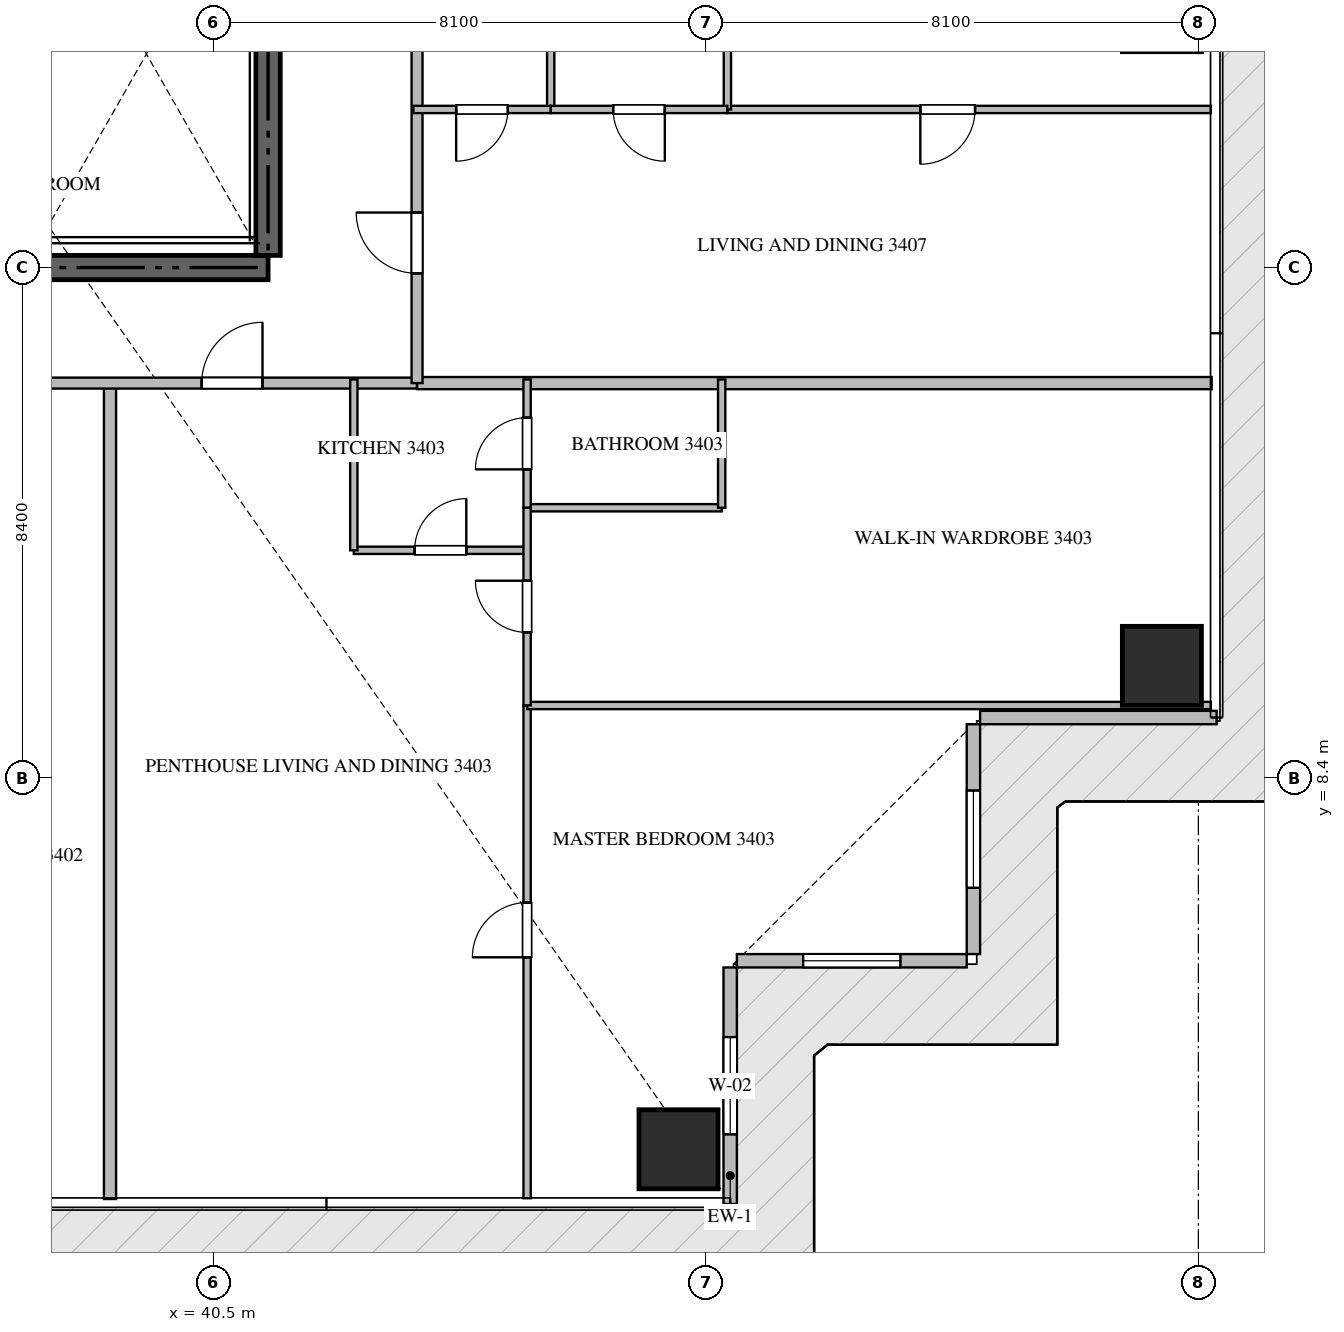
"""IFC4 building model, lengths in metres.
Left out: names, types, materials, properties, quantities, classifications, styles, units other than length and angle.
Written with IfcOpenShell. Run it as: python <this file> out.ifc"""

import sys

from ifc_helpers import new_model, si_unit, direction, frame, frame_2d, origin, origin_2d, place, context, subcontext, project, spatial, rectangle, extrude, source, transform, mapped, element, fill, save


model = new_model("IFC4")
c1 = context("Model", 3, precision=1e-05, world=origin(), true_north=direction((0.0, 1.0)))
c2 = subcontext(c1, "Body", "Model", "MODEL_VIEW")
j1 = project(units=[si_unit("LENGTHUNIT", "METRE"), si_unit("PLANEANGLEUNIT", "RADIAN")], contexts=[c1])
p1 = place(None, origin())
s1 = spatial("IfcSite", under=j1, at=p1, CompositionType="ELEMENT")
p2 = place(p1, origin())
s2 = spatial("IfcBuilding", under=s1, at=p2, CompositionType="ELEMENT")
p3 = place(p2, frame((0.0, 0.0, 138.9)))
s3 = spatial("IfcBuildingStorey", under=s2, at=p3, CompositionType="ELEMENT", Elevation=138.9)
p4 = place(p3, frame((23.4, 16.8, -0.26), z_axis=(0.0, 0.0, 1.0), x_axis=(1.0, 0.0, 0.0)))
e1 = element("IfcWall", 1, at=p4, inside=s3, PredefinedType="SHEAR", context=c2, shape_type="SweptSolid", body=[
    extrude(rectangle(XDim=18.0, YDim=0.4, at=frame_2d((9.0, 0.0))), origin(), (0.0, 0.0, 1.0), 3.748),
])
p5 = place(p3, frame((41.4, 17.0, -0.26), z_axis=(0.0, 0.0, 1.0), x_axis=(0.0, 1.0, 0.0)))
e2 = element("IfcWall", 2, at=p5, inside=s3, PredefinedType="SHEAR", context=c2, shape_type="SweptSolid", body=[
    extrude(rectangle(XDim=8.35, YDim=0.4, at=frame_2d((4.175, 0.0))), origin(), (0.0, 0.0, 1.0), 3.748),
])
m1 = source(origin(), c2, "Body", "SweptSolid", [
    extrude(rectangle(XDim=1.3, YDim=1.3, at=origin_2d()), origin(), (0.0, 0.0, 1.0), 3.75),
])
for number, where, z_axis, x_axis in (
    (3, (48.15, 2.3, -0.26), (0.0, 0.0, 1.0), (1.0, 0.0, 0.0)),
    (4, (56.1, 10.25, -0.26), (0.0, 0.0, 1.0), (1.0, 0.0, 0.0)),
):
    element("IfcColumn", number, at=place(p3, frame(where, z_axis=z_axis, x_axis=x_axis)), inside=s3, PredefinedType="COLUMN", context=c2, shape_type="MappedRepresentation", body=[
        mapped(m1, transform((0.0, 0.0, 0.0), scale=1.0)),
    ])
p6 = place(p3, frame((49.0, 1.4, 0.0), z_axis=(0.0, 0.0, 1.0), x_axis=(0.0, 1.0, 0.0)))
e5 = element("IfcWall", 5, at=p6, inside=s3, PredefinedType="ELEMENTEDWALL", context=c2, shape_type="SweptSolid", body=[
    extrude(rectangle(XDim=3.89, YDim=0.22, at=frame_2d((1.945, 0.0))), origin(), (0.0, 0.0, 1.0), 3.475),
])
p7 = place(p6, frame((1.145, 0.0, 0.65)))
e6 = element("IfcOpeningElement", 6, at=p7, cuts=e5, PredefinedType="OPENING", context=c2, shape_type="SweptSolid", body=[
    extrude(rectangle(XDim=1.6, YDim=2.1, at=frame_2d((0.8, 1.05))), frame((0.0, 0.12, 0.0), z_axis=(0.0, -1.0, 0.0), x_axis=(1.0, 0.0, 0.0)), (0.0, 0.0, 1.0), 0.24),
])
p8 = place(p3, frame((49.11, 5.4, 0.0), z_axis=(0.0, 0.0, 1.0), x_axis=(1.0, 0.0, 0.0)))
e7 = element("IfcWall", 7, at=p8, inside=s3, PredefinedType="ELEMENTEDWALL", context=c2, shape_type="SweptSolid", body=[
    extrude(rectangle(XDim=3.78, YDim=0.22, at=frame_2d((1.89, 0.0))), origin(), (0.0, 0.0, 1.0), 3.475),
])
p9 = place(p8, frame((1.09, 0.0, 0.65)))
e8 = element("IfcOpeningElement", 8, at=p9, cuts=e7, PredefinedType="OPENING", context=c2, shape_type="SweptSolid", body=[
    extrude(rectangle(XDim=1.6, YDim=2.1, at=frame_2d((0.8, 1.05))), frame((0.0, 0.12, 0.0), z_axis=(0.0, -1.0, 0.0), x_axis=(1.0, 0.0, 0.0)), (0.0, 0.0, 1.0), 0.24),
])
p10 = place(p3, frame((53.0, 5.51, 0.0), z_axis=(0.0, 0.0, 1.0), x_axis=(0.0, 1.0, 0.0)))
e9 = element("IfcWall", 9, at=p10, inside=s3, PredefinedType="ELEMENTEDWALL", context=c2, shape_type="SweptSolid", body=[
    extrude(rectangle(XDim=3.78, YDim=0.22, at=frame_2d((1.89, 0.0))), origin(), (0.0, 0.0, 1.0), 3.475),
])
p11 = place(p10, frame((1.09, 0.0, 0.65)))
e10 = element("IfcOpeningElement", 10, at=p11, cuts=e9, PredefinedType="OPENING", context=c2, shape_type="SweptSolid", body=[
    extrude(rectangle(XDim=1.6, YDim=2.1, at=frame_2d((0.8, 1.05))), frame((0.0, 0.12, 0.0), z_axis=(0.0, -1.0, 0.0), x_axis=(1.0, 0.0, 0.0)), (0.0, 0.0, 1.0), 0.24),
])
p12 = place(p3, frame((53.11, 9.4, 0.0), z_axis=(0.0, 0.0, 1.0), x_axis=(1.0, 0.0, 0.0)))
e11 = element("IfcWall", 11, at=p12, inside=s3, PredefinedType="ELEMENTEDWALL", context=c2, shape_type="SweptSolid", body=[
    extrude(rectangle(XDim=3.89, YDim=0.22, at=frame_2d((1.945, 0.0))), origin(), (0.0, 0.0, 1.0), 3.475),
])
p13 = place(p3, frame((38.8, 1.482, 0.0), z_axis=(0.0, 0.0, 1.0), x_axis=(0.0, 1.0, 0.0)))
e12 = element("IfcWall", 12, at=p13, inside=s3, PredefinedType="PARTITIONING", context=c2, shape_type="SweptSolid", body=[
    extrude(rectangle(XDim=13.418, YDim=0.2, at=frame_2d((6.709, 0.0))), origin(), (0.0, 0.0, 1.0), 3.49),
])
p14 = place(p3, frame((43.85, 14.9, 0.0), z_axis=(0.0, 0.0, 1.0), x_axis=(1.0, 0.0, 0.0)))
e13 = element("IfcWall", 13, at=p14, inside=s3, PredefinedType="PARTITIONING", context=c2, shape_type="SweptSolid", body=[
    extrude(rectangle(XDim=13.068, YDim=0.2, at=frame_2d((6.534, 0.0))), origin(), (0.0, 0.0, 1.0), 3.49),
])
p15 = place(p3, frame((20.952, 14.9, 0.0), z_axis=(0.0, 0.0, 1.0), x_axis=(1.0, 0.0, 0.0)))
e14 = element("IfcWall", 14, at=p15, inside=s3, PredefinedType="PARTITIONING", context=c2, shape_type="SweptSolid", body=[
    extrude(rectangle(XDim=22.896, YDim=0.18, at=frame_2d((11.448, 0.0))), origin(), (0.0, 0.0, 1.0), 3.49),
])
p16 = place(p15, frame((2.54, 0.0, 0.0)))
e15 = element("IfcOpeningElement", 15, at=p16, cuts=e14, PredefinedType="OPENING", context=c2, shape_type="SweptSolid", body=[
    extrude(rectangle(XDim=1.0, YDim=2.15, at=frame_2d((0.5, 1.075))), frame((0.0, 0.1, 0.0), z_axis=(0.0, -1.0, 0.0), x_axis=(1.0, 0.0, 0.0)), (0.0, 0.0, 1.0), 0.2),
])
p17 = place(p15, frame((14.911, 0.0, 0.0)))
e16 = element("IfcOpeningElement", 16, at=p17, cuts=e14, PredefinedType="OPENING", context=c2, shape_type="SweptSolid", body=[
    extrude(rectangle(XDim=1.0, YDim=2.15, at=frame_2d((0.5, 1.075))), frame((0.0, 0.1, 0.0), z_axis=(0.0, -1.0, 0.0), x_axis=(1.0, 0.0, 0.0)), (0.0, 0.0, 1.0), 0.2),
])
p18 = place(p15, frame((19.356, 0.0, 0.0)))
e17 = element("IfcOpeningElement", 17, at=p18, cuts=e14, PredefinedType="OPENING", context=c2, shape_type="SweptSolid", body=[
    extrude(rectangle(XDim=1.0, YDim=2.15, at=frame_2d((0.5, 1.075))), frame((0.0, 0.1, 0.0), z_axis=(0.0, -1.0, 0.0), x_axis=(1.0, 0.0, 0.0)), (0.0, 0.0, 1.0), 0.2),
])
p19 = place(p3, frame((43.85, 14.9, 0.0), z_axis=(0.0, 0.0, 1.0), x_axis=(0.0, 1.0, 0.0)))
e18 = element("IfcWall", 18, at=p19, inside=s3, PredefinedType="PARTITIONING", context=c2, shape_type="SweptSolid", body=[
    extrude(rectangle(XDim=18.7, YDim=0.18, at=frame_2d((9.35, 0.0))), origin(), (0.0, 0.0, 1.0), 3.49),
])
p20 = place(p19, frame((1.805, 0.0, 0.0)))
e19 = element("IfcOpeningElement", 19, at=p20, cuts=e18, PredefinedType="OPENING", context=c2, shape_type="SweptSolid", body=[
    extrude(rectangle(XDim=1.0, YDim=2.15, at=frame_2d((0.5, 1.075))), frame((0.0, 0.1, 0.0), z_axis=(0.0, -1.0, 0.0), x_axis=(1.0, 0.0, 0.0)), (0.0, 0.0, 1.0), 0.2),
])
p21 = place(p19, frame((14.833, 0.0, 0.0)))
e20 = element("IfcOpeningElement", 20, at=p21, cuts=e18, PredefinedType="OPENING", context=c2, shape_type="SweptSolid", body=[
    extrude(rectangle(XDim=1.0, YDim=2.15, at=frame_2d((0.5, 1.075))), frame((0.0, 0.1, 0.0), z_axis=(0.0, -1.0, 0.0), x_axis=(1.0, 0.0, 0.0)), (0.0, 0.0, 1.0), 0.2),
])
p22 = place(p3, frame((42.81, 12.15, 0.0), z_axis=(0.0, 0.0, 1.0), x_axis=(1.0, 0.0, 0.0)))
e21 = element("IfcWall", 21, at=p22, inside=s3, PredefinedType="PARTITIONING", context=c2, shape_type="SweptSolid", body=[
    extrude(rectangle(XDim=2.85, YDim=0.12, at=frame_2d((1.425, 0.0))), origin(), (0.0, 0.0, 1.0), 3.49),
])
p23 = place(p22, frame((1.0, 0.0, 0.0)))
e22 = element("IfcOpeningElement", 22, at=p23, cuts=e21, PredefinedType="OPENING", context=c2, shape_type="SweptSolid", body=[
    extrude(rectangle(XDim=0.85, YDim=2.1, at=frame_2d((0.425, 1.05))), frame((0.0, 0.07, 0.0), z_axis=(0.0, -1.0, 0.0), x_axis=(1.0, 0.0, 0.0)), (0.0, 0.0, 1.0), 0.14),
])
p24 = place(p3, frame((42.81, 12.15, 0.0), z_axis=(0.0, 0.0, 1.0), x_axis=(0.0, 1.0, 0.0)))
e23 = element("IfcWall", 23, at=p24, inside=s3, PredefinedType="PARTITIONING", context=c2, shape_type="SweptSolid", body=[
    extrude(rectangle(XDim=2.81, YDim=0.12, at=frame_2d((1.405, 0.0))), origin(), (0.0, 0.0, 1.0), 3.49),
])
p25 = place(p3, frame((45.66, 1.495, 0.0), z_axis=(0.0, 0.0, 1.0), x_axis=(0.0, 1.0, 0.0)))
e24 = element("IfcWall", 24, at=p25, inside=s3, PredefinedType="PARTITIONING", context=c2, shape_type="SweptSolid", body=[
    extrude(rectangle(XDim=8.103, YDim=0.12, at=frame_2d((4.051, 0.0))), origin(), (0.0, 0.0, 1.0), 3.49),
])
p26 = place(p25, frame((3.962, 0.0, 0.0)))
e25 = element("IfcOpeningElement", 25, at=p26, cuts=e24, PredefinedType="OPENING", context=c2, shape_type="SweptSolid", body=[
    extrude(rectangle(XDim=0.9, YDim=2.1, at=frame_2d((0.45, 1.05))), frame((0.0, 0.07, 0.0), z_axis=(0.0, -1.0, 0.0), x_axis=(1.0, 0.0, 0.0)), (0.0, 0.0, 1.0), 0.14),
])
p27 = place(p3, frame((45.66, 9.598, 0.0), z_axis=(0.0, 0.0, 1.0), x_axis=(1.0, 0.0, 0.0)))
e26 = element("IfcWall", 26, at=p27, inside=s3, PredefinedType="PARTITIONING", context=c2, shape_type="SweptSolid", body=[
    extrude(rectangle(XDim=11.245, YDim=0.12, at=frame_2d((5.623, 0.0))), origin(), (0.0, 0.0, 1.0), 3.49),
])
p28 = place(p3, frame((45.66, 12.85, 0.0), z_axis=(0.0, 0.0, 1.0), x_axis=(1.0, 0.0, 0.0)))
e27 = element("IfcWall", 27, at=p28, inside=s3, PredefinedType="PARTITIONING", context=c2, shape_type="SweptSolid", body=[
    extrude(rectangle(XDim=3.2, YDim=0.12, at=frame_2d((1.6, 0.0))), origin(), (0.0, 0.0, 1.0), 3.49),
])
p29 = place(p3, frame((48.86, 12.85, 0.0), z_axis=(0.0, 0.0, 1.0), x_axis=(0.0, 1.0, 0.0)))
e28 = element("IfcWall", 28, at=p29, inside=s3, PredefinedType="PARTITIONING", context=c2, shape_type="SweptSolid", body=[
    extrude(rectangle(XDim=2.11, YDim=0.12, at=frame_2d((1.055, 0.0))), origin(), (0.0, 0.0, 1.0), 3.49),
])
p30 = place(p3, frame((45.66, 9.6, 0.0), z_axis=(0.0, 0.0, 1.0), x_axis=(0.0, 1.0, 0.0)))
e29 = element("IfcWall", 29, at=p30, inside=s3, PredefinedType="PARTITIONING", context=c2, shape_type="SweptSolid", body=[
    extrude(rectangle(XDim=3.25, YDim=0.12, at=frame_2d((1.625, 0.0))), origin(), (0.0, 0.0, 1.0), 3.49),
])
p31 = place(p30, frame((1.2, 0.0, 0.0)))
e30 = element("IfcOpeningElement", 30, at=p31, cuts=e29, PredefinedType="OPENING", context=c2, shape_type="SweptSolid", body=[
    extrude(rectangle(XDim=0.85, YDim=2.1, at=frame_2d((0.425, 1.05))), frame((0.0, 0.07, 0.0), z_axis=(0.0, -1.0, 0.0), x_axis=(1.0, 0.0, 0.0)), (0.0, 0.0, 1.0), 0.14),
])
p32 = place(p3, frame((45.66, 12.852, 0.0), z_axis=(0.0, 0.0, 1.0), x_axis=(0.0, 1.0, 0.0)))
e31 = element("IfcWall", 31, at=p32, inside=s3, PredefinedType="PARTITIONING", context=c2, shape_type="SweptSolid", body=[
    extrude(rectangle(XDim=2.108, YDim=0.12, at=frame_2d((1.054, 0.0))), origin(), (0.0, 0.0, 1.0), 3.49),
])
p33 = place(p32, frame((0.629, 0.0, 0.0)))
e32 = element("IfcOpeningElement", 32, at=p33, cuts=e31, PredefinedType="OPENING", context=c2, shape_type="SweptSolid", body=[
    extrude(rectangle(XDim=0.85, YDim=2.1, at=frame_2d((0.425, 1.05))), frame((0.0, 0.07, 0.0), z_axis=(0.0, -1.0, 0.0), x_axis=(1.0, 0.0, 0.0)), (0.0, 0.0, 1.0), 0.14),
])
p34 = place(p3, frame((56.905, 19.4, 0.0), z_axis=(0.0, 0.0, 1.0), x_axis=(-1.0, 0.0, 0.0)))
e33 = element("IfcWall", 33, at=p34, inside=s3, PredefinedType="PARTITIONING", context=c2, shape_type="SweptSolid", body=[
    extrude(rectangle(XDim=7.951, YDim=0.12, at=frame_2d((3.976, 0.0))), origin(), (0.0, 0.0, 1.0), 3.49),
])
p35 = place(p34, frame((3.878, 0.0, 0.0)))
e34 = element("IfcOpeningElement", 34, at=p35, cuts=e33, PredefinedType="OPENING", context=c2, shape_type="SweptSolid", body=[
    extrude(rectangle(XDim=0.9, YDim=2.1, at=frame_2d((0.45, 1.05))), frame((0.0, 0.07, 0.0), z_axis=(0.0, -1.0, 0.0), x_axis=(1.0, 0.0, 0.0)), (0.0, 0.0, 1.0), 0.14),
])
for number, where, z_axis, x_axis in (
    (35, (48.954, 19.4, 0.0), (0.0, 0.0, 1.0), (0.0, 1.0, 0.0)),
    (36, (46.048, 19.4, 0.0), (0.0, 0.0, 1.0), (0.0, 1.0, 0.0)),
):
    element("IfcWall", number, at=place(p3, frame(where, z_axis=z_axis, x_axis=x_axis)), inside=s3, PredefinedType="PARTITIONING", context=c2, shape_type="SweptSolid", body=[
        extrude(rectangle(XDim=4.86, YDim=0.12, at=frame_2d((2.43, 0.0))), origin(), (0.0, 0.0, 1.0), 3.49),
    ])
p36 = place(p3, frame((48.952, 19.4, 0.0), z_axis=(0.0, 0.0, 1.0), x_axis=(-1.0, 0.0, 0.0)))
e37 = element("IfcWall", 37, at=p36, inside=s3, PredefinedType="PARTITIONING", context=c2, shape_type="SweptSolid", body=[
    extrude(rectangle(XDim=2.904, YDim=0.12, at=frame_2d((1.452, 0.0))), origin(), (0.0, 0.0, 1.0), 3.49),
])
p37 = place(p36, frame((1.027, 0.0, 0.0)))
e38 = element("IfcOpeningElement", 38, at=p37, cuts=e37, PredefinedType="OPENING", context=c2, shape_type="SweptSolid", body=[
    extrude(rectangle(XDim=0.85, YDim=2.1, at=frame_2d((0.425, 1.05))), frame((0.0, 0.07, 0.0), z_axis=(0.0, -1.0, 0.0), x_axis=(1.0, 0.0, 0.0)), (0.0, 0.0, 1.0), 0.14),
])
p38 = place(p3, frame((46.046, 19.4, 0.0), z_axis=(0.0, 0.0, 1.0), x_axis=(-1.0, 0.0, 0.0)))
e39 = element("IfcWall", 39, at=p38, inside=s3, PredefinedType="PARTITIONING", context=c2, shape_type="SweptSolid", body=[
    extrude(rectangle(XDim=2.256, YDim=0.12, at=frame_2d((1.128, 0.0))), origin(), (0.0, 0.0, 1.0), 3.49),
])
p39 = place(p38, frame((0.703, 0.0, 0.0)))
e40 = element("IfcOpeningElement", 40, at=p39, cuts=e39, PredefinedType="OPENING", context=c2, shape_type="SweptSolid", body=[
    extrude(rectangle(XDim=0.85, YDim=2.1, at=frame_2d((0.425, 1.05))), frame((0.0, 0.07, 0.0), z_axis=(0.0, -1.0, 0.0), x_axis=(1.0, 0.0, 0.0)), (0.0, 0.0, 1.0), 0.14),
])
m2 = source(origin(), c2, "Body", "SweptSolid", [
    extrude(rectangle(XDim=1.6, YDim=2.1, at=frame_2d((0.8, 1.05))), frame((0.0, 0.03, 0.0), z_axis=(0.0, -1.0, 0.0), x_axis=(1.0, 0.0, 0.0)), (0.0, 0.0, 1.0), 0.06),
])
p40 = place(p7, origin())
e41 = element("IfcWindow", 41, at=p40, inside=s3, PartitioningType="SINGLE_PANEL", PredefinedType="WINDOW", context=c2, shape_type="MappedRepresentation", body=[
    mapped(m2, transform((0.0, 0.0, 0.0), scale=1.0)),
])
fill(e6, e41)
p41 = place(p9, origin())
e42 = element("IfcWindow", 42, at=p41, inside=s3, PartitioningType="SINGLE_PANEL", PredefinedType="WINDOW", context=c2, shape_type="MappedRepresentation", body=[
    mapped(m2, transform((0.0, 0.0, 0.0), scale=1.0)),
])
fill(e8, e42)
p42 = place(p11, origin())
e43 = element("IfcWindow", 43, at=p42, inside=s3, PartitioningType="SINGLE_PANEL", PredefinedType="WINDOW", context=c2, shape_type="MappedRepresentation", body=[
    mapped(m2, transform((0.0, 0.0, 0.0), scale=1.0)),
])
fill(e10, e43)
m3 = source(origin(), c2, "Body", "SweptSolid", [
    extrude(rectangle(XDim=1.0, YDim=2.15, at=frame_2d((0.5, 1.075))), frame((0.0, 0.025, 0.0), z_axis=(0.0, -1.0, 0.0), x_axis=(1.0, 0.0, 0.0)), (0.0, 0.0, 1.0), 0.05),
])
p43 = place(p18, origin())
e44 = element("IfcDoor", 44, at=p43, inside=s3, OperationType="SINGLE_SWING_RIGHT", PredefinedType="DOOR", context=c2, shape_type="MappedRepresentation", body=[
    mapped(m3, transform((0.0, 0.0, 0.0), scale=1.0)),
])
fill(e17, e44)
p44 = place(p20, origin())
e45 = element("IfcDoor", 45, at=p44, inside=s3, OperationType="SINGLE_SWING_RIGHT", PredefinedType="DOOR", context=c2, shape_type="MappedRepresentation", body=[
    mapped(m3, transform((0.0, 0.0, 0.0), scale=1.0)),
])
fill(e19, e45)
m4 = source(origin(), c2, "Body", "SweptSolid", [
    extrude(rectangle(XDim=0.85, YDim=2.1, at=frame_2d((0.425, 1.05))), frame((0.0, 0.025, 0.0), z_axis=(0.0, -1.0, 0.0), x_axis=(1.0, 0.0, 0.0)), (0.0, 0.0, 1.0), 0.05),
])
p45 = place(p23, origin())
e46 = element("IfcDoor", 46, at=p45, inside=s3, OperationType="SINGLE_SWING_RIGHT", PredefinedType="DOOR", context=c2, shape_type="MappedRepresentation", body=[
    mapped(m4, transform((0.0, 0.0, 0.0), scale=1.0)),
])
fill(e22, e46)
m5 = source(origin(), c2, "Body", "SweptSolid", [
    extrude(rectangle(XDim=0.9, YDim=2.1, at=frame_2d((0.45, 1.05))), frame((0.0, 0.025, 0.0), z_axis=(0.0, -1.0, 0.0), x_axis=(1.0, 0.0, 0.0)), (0.0, 0.0, 1.0), 0.05),
])
p46 = place(p26, origin())
e47 = element("IfcDoor", 47, at=p46, inside=s3, OperationType="SINGLE_SWING_LEFT", PredefinedType="DOOR", context=c2, shape_type="MappedRepresentation", body=[
    mapped(m5, transform((0.0, 0.0, 0.0), scale=1.0)),
])
fill(e25, e47)
p47 = place(p31, origin())
e48 = element("IfcDoor", 48, at=p47, inside=s3, OperationType="SINGLE_SWING_RIGHT", PredefinedType="DOOR", context=c2, shape_type="MappedRepresentation", body=[
    mapped(m4, transform((0.0, 0.0, 0.0), scale=1.0)),
])
fill(e30, e48)
p48 = place(p33, origin())
e49 = element("IfcDoor", 49, at=p48, inside=s3, OperationType="SINGLE_SWING_LEFT", PredefinedType="DOOR", context=c2, shape_type="MappedRepresentation", body=[
    mapped(m4, transform((0.0, 0.0, 0.0), scale=1.0)),
])
fill(e32, e49)
p49 = place(p35, origin())
e50 = element("IfcDoor", 50, at=p49, inside=s3, OperationType="SINGLE_SWING_RIGHT", PredefinedType="DOOR", context=c2, shape_type="MappedRepresentation", body=[
    mapped(m5, transform((0.0, 0.0, 0.0), scale=1.0)),
])
fill(e34, e50)
p50 = place(p37, origin())
e51 = element("IfcDoor", 51, at=p50, inside=s3, OperationType="SINGLE_SWING_LEFT", PredefinedType="DOOR", context=c2, shape_type="MappedRepresentation", body=[
    mapped(m4, transform((0.0, 0.0, 0.0), scale=1.0)),
])
fill(e38, e51)
p51 = place(p39, origin())
e52 = element("IfcDoor", 52, at=p51, inside=s3, OperationType="SINGLE_SWING_RIGHT", PredefinedType="DOOR", context=c2, shape_type="MappedRepresentation", body=[
    mapped(m4, transform((0.0, 0.0, 0.0), scale=1.0)),
])
fill(e40, e52)
save(model, sys.argv[1])
